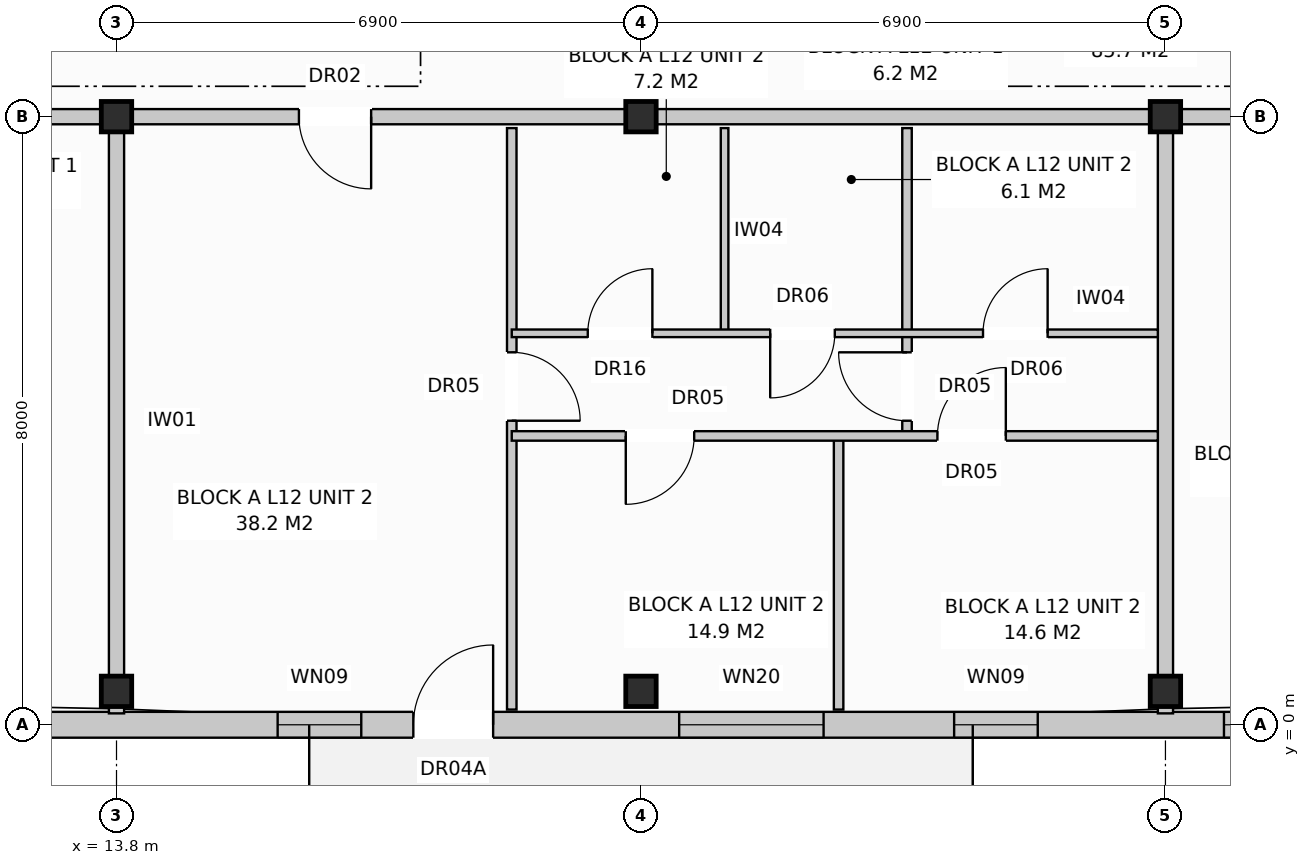
"""IFC4 building model, lengths in metres.
Left out: names, types, materials, properties, quantities, classifications, styles, units other than length and angle.
Written with IfcOpenShell. Run it as: python <this file> out.ifc"""

import sys

from ifc_helpers import new_model, si_unit, direction, frame, frame_2d, origin, origin_with_axes, origin_2d, place, context, subcontext, project, spatial, rectangle, extrude, element, fill, save


model = new_model("IFC4")
c1 = context("Model", 3, precision=1e-05, world=origin(), true_north=direction((0.0, 1.0)))
c2 = subcontext(c1, "Body", "Model", "MODEL_VIEW")
j1 = project(units=[si_unit("LENGTHUNIT", "METRE"), si_unit("PLANEANGLEUNIT", "RADIAN")], contexts=[c1])
p1 = place(None, origin())
s1 = spatial("IfcSite", under=j1, at=p1, CompositionType="ELEMENT")
p2 = place(p1, origin())
s2 = spatial("IfcBuilding", under=s1, at=p2, CompositionType="ELEMENT")
p3 = place(p2, frame((0.0, 0.0, 40.0)))
s3 = spatial("IfcBuildingStorey", under=s2, at=p3, CompositionType="ELEMENT", Elevation=40.0)
for number, where, z_axis, x_axis in (
    (1, (13.8, 0.44, 0.0), (0.0, 0.0, 1.0), (1.0, 0.0, 0.0)),
    (2, (13.8, 8.0, 0.0), (0.0, 0.0, 1.0), (1.0, 0.0, 0.0)),
    (3, (20.7, 0.44, 0.0), (0.0, 0.0, 1.0), (1.0, 0.0, 0.0)),
    (4, (20.7, 8.0, 0.0), (0.0, 0.0, 1.0), (1.0, 0.0, 0.0)),
    (5, (27.6, 0.44, 0.0), (0.0, 0.0, 1.0), (1.0, 0.0, 0.0)),
    (6, (27.6, 8.0, 0.0), (0.0, 0.0, 1.0), (1.0, 0.0, 0.0)),
):
    element("IfcColumn", number, at=place(p3, frame(where, z_axis=z_axis, x_axis=x_axis)), inside=s3, PredefinedType="COLUMN", context=c2, shape_type="SweptSolid", body=[
        extrude(rectangle(XDim=0.4, YDim=0.4, at=origin_2d()), origin(), (0.0, 0.0, 1.0), 3.2),
    ])
p4 = place(p3, frame((0.16, 0.0, 0.0), z_axis=(0.0, 0.0, 1.0), x_axis=(1.0, 0.0, 0.0)))
e7 = element("IfcWall", 7, at=p4, inside=s3, PredefinedType="STANDARD", context=c2, shape_type="SweptSolid", body=[
    extrude(rectangle(XDim=41.08, YDim=0.34, at=frame_2d((20.54, 0.0))), origin(), (0.0, 0.0, 1.0), 2.97),
])
p5 = place(p4, frame((2.745, 0.0, 0.0)))
e8 = element("IfcOpeningElement", 8, at=p5, cuts=e7, PredefinedType="OPENING", context=c2, shape_type="SweptSolid", body=[
    extrude(rectangle(XDim=1.05, YDim=2.12, at=frame_2d((0.525, 1.06))), frame((0.0, 0.182, 0.0), z_axis=(0.0, -1.0, 0.0), x_axis=(1.0, 0.0, 0.0)), (0.0, 0.0, 1.0), 0.364),
])
p6 = place(p4, frame((17.545, 0.0, 0.0)))
e9 = element("IfcOpeningElement", 9, at=p6, cuts=e7, PredefinedType="OPENING", context=c2, shape_type="SweptSolid", body=[
    extrude(rectangle(XDim=1.05, YDim=2.12, at=frame_2d((0.525, 1.06))), frame((0.0, 0.182, 0.0), z_axis=(0.0, -1.0, 0.0), x_axis=(1.0, 0.0, 0.0)), (0.0, 0.0, 1.0), 0.364),
])
p7 = place(p4, frame((30.045, 0.0, 0.0)))
e10 = element("IfcOpeningElement", 10, at=p7, cuts=e7, PredefinedType="OPENING", context=c2, shape_type="SweptSolid", body=[
    extrude(rectangle(XDim=1.05, YDim=2.12, at=frame_2d((0.525, 1.06))), frame((0.0, 0.182, 0.0), z_axis=(0.0, -1.0, 0.0), x_axis=(1.0, 0.0, 0.0)), (0.0, 0.0, 1.0), 0.364),
])
p8 = place(p4, frame((0.61, 0.0, 0.8)))
e11 = element("IfcOpeningElement", 11, at=p8, cuts=e7, PredefinedType="OPENING", context=c2, shape_type="SweptSolid", body=[
    extrude(rectangle(XDim=1.8, YDim=1.7, at=frame_2d((0.9, 0.85))), frame((0.0, 0.182, 0.0), z_axis=(0.0, -1.0, 0.0), x_axis=(1.0, 0.0, 0.0)), (0.0, 0.0, 1.0), 0.364),
])
p9 = place(p4, frame((4.36, 0.0, 0.72)))
e12 = element("IfcOpeningElement", 12, at=p9, cuts=e7, PredefinedType="OPENING", context=c2, shape_type="SweptSolid", body=[
    extrude(rectangle(XDim=1.9, YDim=1.85, at=frame_2d((0.95, 0.925))), frame((0.0, 0.182, 0.0), z_axis=(0.0, -1.0, 0.0), x_axis=(1.0, 0.0, 0.0)), (0.0, 0.0, 1.0), 0.364),
])
p10 = place(p4, frame((10.46, 0.0, 0.72)))
e13 = element("IfcOpeningElement", 13, at=p10, cuts=e7, PredefinedType="OPENING", context=c2, shape_type="SweptSolid", body=[
    extrude(rectangle(XDim=1.1, YDim=1.5, at=frame_2d((0.55, 0.75))), frame((0.0, 0.182, 0.0), z_axis=(0.0, -1.0, 0.0), x_axis=(1.0, 0.0, 0.0)), (0.0, 0.0, 1.0), 0.364),
])
p11 = place(p4, frame((15.76, 0.0, 0.72)))
e14 = element("IfcOpeningElement", 14, at=p11, cuts=e7, PredefinedType="OPENING", context=c2, shape_type="SweptSolid", body=[
    extrude(rectangle(XDim=1.1, YDim=1.5, at=frame_2d((0.55, 0.75))), frame((0.0, 0.182, 0.0), z_axis=(0.0, -1.0, 0.0), x_axis=(1.0, 0.0, 0.0)), (0.0, 0.0, 1.0), 0.364),
])
p12 = place(p4, frame((21.042, 0.0, 0.72)))
e15 = element("IfcOpeningElement", 15, at=p12, cuts=e7, PredefinedType="OPENING", context=c2, shape_type="SweptSolid", body=[
    extrude(rectangle(XDim=1.9, YDim=1.85, at=frame_2d((0.95, 0.925))), frame((0.0, 0.182, 0.0), z_axis=(0.0, -1.0, 0.0), x_axis=(1.0, 0.0, 0.0)), (0.0, 0.0, 1.0), 0.364),
])
p13 = place(p4, frame((24.66, 0.0, 0.72)))
e16 = element("IfcOpeningElement", 16, at=p13, cuts=e7, PredefinedType="OPENING", context=c2, shape_type="SweptSolid", body=[
    extrude(rectangle(XDim=1.1, YDim=1.5, at=frame_2d((0.55, 0.75))), frame((0.0, 0.182, 0.0), z_axis=(0.0, -1.0, 0.0), x_axis=(1.0, 0.0, 0.0)), (0.0, 0.0, 1.0), 0.364),
])
p14 = place(p4, frame((28.21, 0.0, 0.85)))
e17 = element("IfcOpeningElement", 17, at=p14, cuts=e7, PredefinedType="OPENING", context=c2, shape_type="SweptSolid", body=[
    extrude(rectangle(XDim=1.5, YDim=1.65, at=frame_2d((0.75, 0.825))), frame((0.0, 0.182, 0.0), z_axis=(0.0, -1.0, 0.0), x_axis=(1.0, 0.0, 0.0)), (0.0, 0.0, 1.0), 0.364),
])
p15 = place(p4, frame((31.86, 0.0, 0.72)))
e18 = element("IfcOpeningElement", 18, at=p15, cuts=e7, PredefinedType="OPENING", context=c2, shape_type="SweptSolid", body=[
    extrude(rectangle(XDim=1.9, YDim=1.85, at=frame_2d((0.95, 0.925))), frame((0.0, 0.182, 0.0), z_axis=(0.0, -1.0, 0.0), x_axis=(1.0, 0.0, 0.0)), (0.0, 0.0, 1.0), 0.364),
])
p16 = place(p4, frame((35.335, 0.0, 0.8)))
e19 = element("IfcOpeningElement", 19, at=p16, cuts=e7, PredefinedType="OPENING", context=c2, shape_type="SweptSolid", body=[
    extrude(rectangle(XDim=1.95, YDim=1.65, at=frame_2d((0.975, 0.825))), frame((0.0, 0.182, 0.0), z_axis=(0.0, -1.0, 0.0), x_axis=(1.0, 0.0, 0.0)), (0.0, 0.0, 1.0), 0.364),
])
p17 = place(p4, frame((38.675, 0.0, 0.8)))
e20 = element("IfcOpeningElement", 20, at=p17, cuts=e7, PredefinedType="OPENING", context=c2, shape_type="SweptSolid", body=[
    extrude(rectangle(XDim=1.8, YDim=1.7, at=frame_2d((0.9, 0.85))), frame((0.0, 0.182, 0.0), z_axis=(0.0, -1.0, 0.0), x_axis=(1.0, 0.0, 0.0)), (0.0, 0.0, 1.0), 0.364),
])
p18 = place(p3, frame((13.8, 7.85, 0.0), z_axis=(0.0, 0.0, 1.0), x_axis=(0.0, -1.0, 0.0)))
e21 = element("IfcWall", 21, at=p18, inside=s3, PredefinedType="PARTITIONING", context=c2, shape_type="SweptSolid", body=[
    extrude(rectangle(XDim=7.7, YDim=0.2, at=frame_2d((3.85, 0.0))), origin(), (0.0, 0.0, 1.0), 2.97),
])
p19 = place(p3, frame((0.0, 8.0, 0.0), z_axis=(0.0, 0.0, 1.0), x_axis=(1.0, 0.0, 0.0)))
e22 = element("IfcWall", 22, at=p19, inside=s3, PredefinedType="PARTITIONING", context=c2, shape_type="SweptSolid", body=[
    extrude(rectangle(XDim=13.8, YDim=0.2, at=frame_2d((6.9, 0.0))), origin(), (0.0, 0.0, 1.0), 2.41),
])
p20 = place(p19, frame((9.6, 0.0, 0.0)))
e23 = element("IfcOpeningElement", 23, at=p20, cuts=e22, PredefinedType="OPENING", context=c2, shape_type="SweptSolid", body=[
    extrude(rectangle(XDim=0.95, YDim=2.15, at=frame_2d((0.475, 1.075))), frame((0.0, 0.112, 0.0), z_axis=(0.0, -1.0, 0.0), x_axis=(1.0, 0.0, 0.0)), (0.0, 0.0, 1.0), 0.224),
])
p21 = place(p3, frame((27.6, 7.85, 0.0), z_axis=(0.0, 0.0, 1.0), x_axis=(0.0, -1.0, 0.0)))
e24 = element("IfcWall", 24, at=p21, inside=s3, PredefinedType="PARTITIONING", context=c2, shape_type="SweptSolid", body=[
    extrude(rectangle(XDim=7.7, YDim=0.2, at=frame_2d((3.85, 0.0))), origin(), (0.0, 0.0, 1.0), 2.97),
])
p22 = place(p3, frame((13.8, 8.0, 0.0), z_axis=(0.0, 0.0, 1.0), x_axis=(1.0, 0.0, 0.0)))
e25 = element("IfcWall", 25, at=p22, inside=s3, PredefinedType="PARTITIONING", context=c2, shape_type="SweptSolid", body=[
    extrude(rectangle(XDim=13.8, YDim=0.2, at=frame_2d((6.9, 0.0))), origin(), (0.0, 0.0, 1.0), 2.41),
])
p23 = place(p22, frame((2.4, 0.0, 0.0)))
e26 = element("IfcOpeningElement", 26, at=p23, cuts=e25, PredefinedType="OPENING", context=c2, shape_type="SweptSolid", body=[
    extrude(rectangle(XDim=0.95, YDim=2.15, at=frame_2d((0.475, 1.075))), frame((0.0, 0.112, 0.0), z_axis=(0.0, -1.0, 0.0), x_axis=(1.0, 0.0, 0.0)), (0.0, 0.0, 1.0), 0.224),
])
p24 = place(p3, frame((19.0, 7.85, 0.0), z_axis=(0.0, 0.0, 1.0), x_axis=(0.0, -1.0, 0.0)))
e27 = element("IfcWall", 27, at=p24, inside=s3, PredefinedType="PARTITIONING", context=c2, shape_type="SweptSolid", body=[
    extrude(rectangle(XDim=7.65, YDim=0.125, at=frame_2d((3.825, 0.0))), origin(), (0.0, 0.0, 1.0), 2.97),
])
p25 = place(p24, frame((2.95, 0.0, 0.0)))
e28 = element("IfcOpeningElement", 28, at=p25, cuts=e27, PredefinedType="OPENING", context=c2, shape_type="SweptSolid", body=[
    extrude(rectangle(XDim=0.9, YDim=2.1, at=frame_2d((0.45, 1.05))), frame((0.0, 0.074, 0.0), z_axis=(0.0, -1.0, 0.0), x_axis=(1.0, 0.0, 0.0)), (0.0, 0.0, 1.0), 0.149),
])
p26 = place(p3, frame((21.8, 7.85, 0.0), z_axis=(0.0, 0.0, 1.0), x_axis=(0.0, -1.0, 0.0)))
e29 = element("IfcWall", 29, at=p26, inside=s3, PredefinedType="PARTITIONING", context=c2, shape_type="SweptSolid", body=[
    extrude(rectangle(XDim=2.7, YDim=0.1, at=frame_2d((1.35, 0.0))), origin(), (0.0, 0.0, 1.0), 2.97),
])
p27 = place(p3, frame((24.2, 7.85, 0.0), z_axis=(0.0, 0.0, 1.0), x_axis=(0.0, -1.0, 0.0)))
e30 = element("IfcWall", 30, at=p27, inside=s3, PredefinedType="PARTITIONING", context=c2, shape_type="SweptSolid", body=[
    extrude(rectangle(XDim=4.05, YDim=0.125, at=frame_2d((2.025, 0.0))), origin(), (0.0, 0.0, 1.0), 2.59),
])
p28 = place(p27, frame((2.95, 0.0, 0.0)))
e31 = element("IfcOpeningElement", 31, at=p28, cuts=e30, PredefinedType="OPENING", context=c2, shape_type="SweptSolid", body=[
    extrude(rectangle(XDim=0.9, YDim=2.1, at=frame_2d((0.45, 1.05))), frame((0.0, 0.074, 0.0), z_axis=(0.0, -1.0, 0.0), x_axis=(1.0, 0.0, 0.0)), (0.0, 0.0, 1.0), 0.149),
])
p29 = place(p3, frame((23.3, 3.8, 0.0), z_axis=(0.0, 0.0, 1.0), x_axis=(0.0, -1.0, 0.0)))
e32 = element("IfcWall", 32, at=p29, inside=s3, PredefinedType="PARTITIONING", context=c2, shape_type="SweptSolid", body=[
    extrude(rectangle(XDim=3.6, YDim=0.125, at=frame_2d((1.8, 0.0))), origin(), (0.0, 0.0, 1.0), 2.97),
])
p30 = place(p3, frame((19.0, 5.15, 0.0), z_axis=(0.0, 0.0, 1.0), x_axis=(1.0, 0.0, 0.0)))
e33 = element("IfcWall", 33, at=p30, inside=s3, PredefinedType="PARTITIONING", context=c2, shape_type="SweptSolid", body=[
    extrude(rectangle(XDim=8.5, YDim=0.1, at=frame_2d((4.25, 0.0))), origin(), (0.0, 0.0, 1.0), 2.97),
])
p31 = place(p30, frame((1.0, 0.0, 0.0)))
e34 = element("IfcOpeningElement", 34, at=p31, cuts=e33, PredefinedType="OPENING", context=c2, shape_type="SweptSolid", body=[
    extrude(rectangle(XDim=0.85, YDim=2.1, at=frame_2d((0.425, 1.05))), frame((0.0, 0.062, 0.0), z_axis=(0.0, -1.0, 0.0), x_axis=(1.0, 0.0, 0.0)), (0.0, 0.0, 1.0), 0.124),
])
p32 = place(p30, frame((3.4, 0.0, 0.0)))
e35 = element("IfcOpeningElement", 35, at=p32, cuts=e33, PredefinedType="OPENING", context=c2, shape_type="SweptSolid", body=[
    extrude(rectangle(XDim=0.85, YDim=2.05, at=frame_2d((0.425, 1.025))), frame((0.0, 0.062, 0.0), z_axis=(0.0, -1.0, 0.0), x_axis=(1.0, 0.0, 0.0)), (0.0, 0.0, 1.0), 0.124),
])
p33 = place(p30, frame((6.2, 0.0, 0.0)))
e36 = element("IfcOpeningElement", 36, at=p33, cuts=e33, PredefinedType="OPENING", context=c2, shape_type="SweptSolid", body=[
    extrude(rectangle(XDim=0.85, YDim=2.05, at=frame_2d((0.425, 1.025))), frame((0.0, 0.062, 0.0), z_axis=(0.0, -1.0, 0.0), x_axis=(1.0, 0.0, 0.0)), (0.0, 0.0, 1.0), 0.124),
])
p34 = place(p3, frame((19.0, 3.8, 0.0), z_axis=(0.0, 0.0, 1.0), x_axis=(1.0, 0.0, 0.0)))
e37 = element("IfcWall", 37, at=p34, inside=s3, PredefinedType="PARTITIONING", context=c2, shape_type="SweptSolid", body=[
    extrude(rectangle(XDim=8.5, YDim=0.125, at=frame_2d((4.25, 0.0))), origin(), (0.0, 0.0, 1.0), 2.97),
])
p35 = place(p34, frame((1.5, 0.0, 0.0)))
e38 = element("IfcOpeningElement", 38, at=p35, cuts=e37, PredefinedType="OPENING", context=c2, shape_type="SweptSolid", body=[
    extrude(rectangle(XDim=0.9, YDim=2.1, at=frame_2d((0.45, 1.05))), frame((0.0, 0.074, 0.0), z_axis=(0.0, -1.0, 0.0), x_axis=(1.0, 0.0, 0.0)), (0.0, 0.0, 1.0), 0.149),
])
p36 = place(p34, frame((5.6, 0.0, 0.0)))
e39 = element("IfcOpeningElement", 39, at=p36, cuts=e37, PredefinedType="OPENING", context=c2, shape_type="SweptSolid", body=[
    extrude(rectangle(XDim=0.9, YDim=2.1, at=frame_2d((0.45, 1.05))), frame((0.0, 0.074, 0.0), z_axis=(0.0, -1.0, 0.0), x_axis=(1.0, 0.0, 0.0)), (0.0, 0.0, 1.0), 0.149),
])
p37 = place(p3, frame((27.6, 8.0, 0.0), z_axis=(0.0, 0.0, 1.0), x_axis=(1.0, 0.0, 0.0)))
e40 = element("IfcWall", 40, at=p37, inside=s3, PredefinedType="PARTITIONING", context=c2, shape_type="SweptSolid", body=[
    extrude(rectangle(XDim=6.9, YDim=0.2, at=frame_2d((3.45, 0.0))), origin(), (0.0, 0.0, 1.0), 2.41),
])
p38 = place(p37, frame((2.0, 0.0, 0.0)))
e41 = element("IfcOpeningElement", 41, at=p38, cuts=e40, PredefinedType="OPENING", context=c2, shape_type="SweptSolid", body=[
    extrude(rectangle(XDim=0.95, YDim=2.15, at=frame_2d((0.475, 1.075))), frame((0.0, 0.112, 0.0), z_axis=(0.0, -1.0, 0.0), x_axis=(1.0, 0.0, 0.0)), (0.0, 0.0, 1.0), 0.224),
])
p39 = place(p6, origin_with_axes())
e42 = element("IfcDoor", 42, at=p39, inside=s3, OperationType="SINGLE_SWING_RIGHT", PredefinedType="DOOR", context=c2, shape_type="SweptSolid", body=[
    extrude(rectangle(XDim=1.05, YDim=2.12, at=frame_2d((0.525, 1.06))), frame((0.0, 0.025, 0.0), z_axis=(0.0, -1.0, 0.0), x_axis=(1.0, 0.0, 0.0)), (0.0, 0.0, 1.0), 0.05),
])
fill(e9, e42)
p40 = place(p11, origin_with_axes())
e43 = element("IfcWindow", 43, at=p40, inside=s3, PartitioningType="SINGLE_PANEL", PredefinedType="WINDOW", context=c2, shape_type="SweptSolid", body=[
    extrude(rectangle(XDim=1.1, YDim=1.5, at=frame_2d((0.55, 0.75))), frame((0.0, 0.03, 0.0), z_axis=(0.0, -1.0, 0.0), x_axis=(1.0, 0.0, 0.0)), (0.0, 0.0, 1.0), 0.06),
])
fill(e14, e43)
p41 = place(p12, origin_with_axes())
e44 = element("IfcWindow", 44, at=p41, inside=s3, PartitioningType="SINGLE_PANEL", PredefinedType="WINDOW", context=c2, shape_type="SweptSolid", body=[
    extrude(rectangle(XDim=1.9, YDim=1.85, at=frame_2d((0.95, 0.925))), frame((0.0, 0.03, 0.0), z_axis=(0.0, -1.0, 0.0), x_axis=(1.0, 0.0, 0.0)), (0.0, 0.0, 1.0), 0.06),
])
fill(e15, e44)
p42 = place(p13, origin_with_axes())
e45 = element("IfcWindow", 45, at=p42, inside=s3, PartitioningType="SINGLE_PANEL", PredefinedType="WINDOW", context=c2, shape_type="SweptSolid", body=[
    extrude(rectangle(XDim=1.1, YDim=1.5, at=frame_2d((0.55, 0.75))), frame((0.0, 0.03, 0.0), z_axis=(0.0, -1.0, 0.0), x_axis=(1.0, 0.0, 0.0)), (0.0, 0.0, 1.0), 0.06),
])
fill(e16, e45)
p43 = place(p14, origin_with_axes())
e46 = element("IfcWindow", 46, at=p43, inside=s3, PartitioningType="SINGLE_PANEL", PredefinedType="WINDOW", context=c2, shape_type="SweptSolid", body=[
    extrude(rectangle(XDim=1.5, YDim=1.65, at=frame_2d((0.75, 0.825))), frame((0.0, 0.03, 0.0), z_axis=(0.0, -1.0, 0.0), x_axis=(1.0, 0.0, 0.0)), (0.0, 0.0, 1.0), 0.06),
])
fill(e17, e46)
p44 = place(p23, frame((0.95, 0.0, 0.0), z_axis=(0.0, 0.0, 1.0), x_axis=(-1.0, 0.0, 0.0)))
e47 = element("IfcDoor", 47, at=p44, inside=s3, OperationType="SINGLE_SWING_RIGHT", PredefinedType="DOOR", context=c2, shape_type="SweptSolid", body=[
    extrude(rectangle(XDim=0.95, YDim=2.15, at=frame_2d((0.475, 1.075))), frame((0.0, 0.025, 0.0), z_axis=(0.0, -1.0, 0.0), x_axis=(1.0, 0.0, 0.0)), (0.0, 0.0, 1.0), 0.05),
])
fill(e26, e47)
p45 = place(p25, origin_with_axes())
e48 = element("IfcDoor", 48, at=p45, inside=s3, OperationType="SINGLE_SWING_RIGHT", PredefinedType="DOOR", context=c2, shape_type="SweptSolid", body=[
    extrude(rectangle(XDim=0.9, YDim=2.1, at=frame_2d((0.45, 1.05))), frame((0.0, 0.025, 0.0), z_axis=(0.0, -1.0, 0.0), x_axis=(1.0, 0.0, 0.0)), (0.0, 0.0, 1.0), 0.05),
])
fill(e28, e48)
p46 = place(p28, frame((0.9, 0.0, 0.0), z_axis=(0.0, 0.0, 1.0), x_axis=(-1.0, 0.0, 0.0)))
e49 = element("IfcDoor", 49, at=p46, inside=s3, OperationType="SINGLE_SWING_LEFT", PredefinedType="DOOR", context=c2, shape_type="SweptSolid", body=[
    extrude(rectangle(XDim=0.9, YDim=2.1, at=frame_2d((0.45, 1.05))), frame((0.0, 0.025, 0.0), z_axis=(0.0, -1.0, 0.0), x_axis=(1.0, 0.0, 0.0)), (0.0, 0.0, 1.0), 0.05),
])
fill(e31, e49)
p47 = place(p31, origin_with_axes())
e50 = element("IfcDoor", 50, at=p47, inside=s3, OperationType="SINGLE_SWING_RIGHT", PredefinedType="DOOR", context=c2, shape_type="SweptSolid", body=[
    extrude(rectangle(XDim=0.85, YDim=2.1, at=frame_2d((0.425, 1.05))), frame((0.0, 0.025, 0.0), z_axis=(0.0, -1.0, 0.0), x_axis=(1.0, 0.0, 0.0)), (0.0, 0.0, 1.0), 0.05),
])
fill(e34, e50)
p48 = place(p32, frame((0.85, 0.0, 0.0), z_axis=(0.0, 0.0, 1.0), x_axis=(-1.0, 0.0, 0.0)))
e51 = element("IfcDoor", 51, at=p48, inside=s3, OperationType="SINGLE_SWING_LEFT", PredefinedType="DOOR", context=c2, shape_type="SweptSolid", body=[
    extrude(rectangle(XDim=0.85, YDim=2.05, at=frame_2d((0.425, 1.025))), frame((0.0, 0.025, 0.0), z_axis=(0.0, -1.0, 0.0), x_axis=(1.0, 0.0, 0.0)), (0.0, 0.0, 1.0), 0.05),
])
fill(e35, e51)
p49 = place(p33, origin_with_axes())
e52 = element("IfcDoor", 52, at=p49, inside=s3, OperationType="SINGLE_SWING_RIGHT", PredefinedType="DOOR", context=c2, shape_type="SweptSolid", body=[
    extrude(rectangle(XDim=0.85, YDim=2.05, at=frame_2d((0.425, 1.025))), frame((0.0, 0.025, 0.0), z_axis=(0.0, -1.0, 0.0), x_axis=(1.0, 0.0, 0.0)), (0.0, 0.0, 1.0), 0.05),
])
fill(e36, e52)
p50 = place(p35, frame((0.9, 0.0, 0.0), z_axis=(0.0, 0.0, 1.0), x_axis=(-1.0, 0.0, 0.0)))
e53 = element("IfcDoor", 53, at=p50, inside=s3, OperationType="SINGLE_SWING_LEFT", PredefinedType="DOOR", context=c2, shape_type="SweptSolid", body=[
    extrude(rectangle(XDim=0.9, YDim=2.1, at=frame_2d((0.45, 1.05))), frame((0.0, 0.025, 0.0), z_axis=(0.0, -1.0, 0.0), x_axis=(1.0, 0.0, 0.0)), (0.0, 0.0, 1.0), 0.05),
])
fill(e38, e53)
p51 = place(p36, origin_with_axes())
e54 = element("IfcDoor", 54, at=p51, inside=s3, OperationType="SINGLE_SWING_RIGHT", PredefinedType="DOOR", context=c2, shape_type="SweptSolid", body=[
    extrude(rectangle(XDim=0.9, YDim=2.1, at=frame_2d((0.45, 1.05))), frame((0.0, 0.025, 0.0), z_axis=(0.0, -1.0, 0.0), x_axis=(1.0, 0.0, 0.0)), (0.0, 0.0, 1.0), 0.05),
])
fill(e39, e54)
save(model, sys.argv[1])
